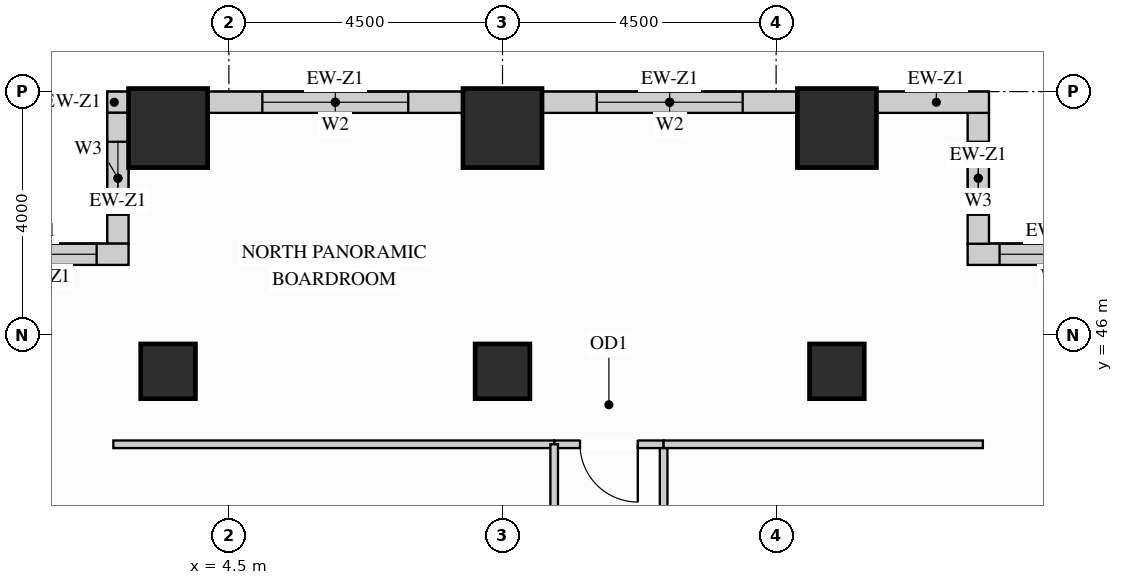
"""IFC4 building model, lengths in metres.
Left out: names, types, materials, properties, quantities, classifications, styles, units other than length and angle.
Written with IfcOpenShell. Run it as: python <this file> out.ifc"""

import sys

from ifc_helpers import new_model, si_unit, direction, frame, frame_2d, origin, origin_2d, place, context, subcontext, project, spatial, rectangle, extrude, source, transform, mapped, element, fill, save


model = new_model("IFC4")
c1 = context("Model", 3, precision=1e-05, world=origin(), true_north=direction((0.0, 1.0)))
c2 = subcontext(c1, "Body", "Model", "MODEL_VIEW")
j1 = project(units=[si_unit("LENGTHUNIT", "METRE"), si_unit("PLANEANGLEUNIT", "RADIAN")], contexts=[c1])
p1 = place(None, origin())
s1 = spatial("IfcSite", under=j1, at=p1, CompositionType="ELEMENT")
p2 = place(p1, origin())
s2 = spatial("IfcBuilding", under=s1, at=p2, CompositionType="ELEMENT")
p3 = place(p2, frame((0.0, 0.0, 54.9)))
s3 = spatial("IfcBuildingStorey", under=s2, at=p3, CompositionType="ELEMENT", Elevation=54.9)
m1 = source(origin(), c2, "Body", "SweptSolid", [
    extrude(rectangle(XDim=0.9, YDim=0.9, at=origin_2d()), origin(), (0.0, 0.0, 1.0), 3.38),
])
for number, where, z_axis, x_axis in (
    (1, (14.5, 45.4, 0.0), (0.0, 0.0, 1.0), (1.0, 0.0, 0.0)),
    (2, (3.5, 45.4, 0.0), (0.0, 0.0, 1.0), (1.0, 0.0, 0.0)),
    (3, (9.0, 45.4, 0.0), (0.0, 0.0, 1.0), (1.0, 0.0, 0.0)),
):
    element("IfcColumn", number, at=place(p3, frame(where, z_axis=z_axis, x_axis=x_axis)), inside=s3, PredefinedType="COLUMN", context=c2, shape_type="MappedRepresentation", body=[
        mapped(m1, transform((0.0, 0.0, 0.0), x_axis=(1.0, 0.0, 0.0), y_axis=(0.0, 1.0, 0.0), z_axis=(0.0, 0.0, 1.0))),
    ])
m2 = source(origin(), c2, "Body", "SweptSolid", [
    extrude(rectangle(XDim=1.3, YDim=1.3, at=origin_2d()), origin(), (0.0, 0.0, 1.0), 3.38),
])
for number, where, z_axis, x_axis in (
    (4, (14.5, 49.4, 0.0), (0.0, 0.0, 1.0), (1.0, 0.0, 0.0)),
    (5, (3.5, 49.4, 0.0), (0.0, 0.0, 1.0), (1.0, 0.0, 0.0)),
    (6, (9.0, 49.4, 0.0), (0.0, 0.0, 1.0), (1.0, 0.0, 0.0)),
):
    element("IfcColumn", number, at=place(p3, frame(where, z_axis=z_axis, x_axis=x_axis)), inside=s3, PredefinedType="COLUMN", context=c2, shape_type="MappedRepresentation", body=[
        mapped(m2, transform((0.0, 0.0, 0.0), x_axis=(1.0, 0.0, 0.0), y_axis=(0.0, 1.0, 0.0), z_axis=(0.0, 0.0, 1.0))),
    ])
p4 = place(p3, frame((19.5, 47.325, 0.0), z_axis=(0.0, 0.0, 1.0), x_axis=(-1.0, 0.0, 0.0)))
e7 = element("IfcWall", 7, at=p4, inside=s3, PredefinedType="SOLIDWALL", context=c2, shape_type="SweptSolid", body=[
    extrude(rectangle(XDim=2.85, YDim=0.35, at=frame_2d((1.425, 0.0))), origin(), (0.0, 0.0, 1.0), 3.365),
])
p5 = place(p4, frame((0.525, 0.0, 0.78)))
e8 = element("IfcOpeningElement", 8, at=p5, cuts=e7, PredefinedType="OPENING", context=c2, shape_type="SweptSolid", body=[
    extrude(rectangle(XDim=1.8, YDim=2.1, at=frame_2d((0.9, 1.05))), frame((0.0, 0.185, 0.0), z_axis=(0.0, -1.0, 0.0), x_axis=(1.0, 0.0, 0.0)), (0.0, 0.0, 1.0), 0.37),
])
p6 = place(p3, frame((16.825, 47.498, 0.0), z_axis=(0.0, 0.0, 1.0), x_axis=(0.0, 1.0, 0.0)))
e9 = element("IfcWall", 9, at=p6, inside=s3, PredefinedType="SOLIDWALL", context=c2, shape_type="SweptSolid", body=[
    extrude(rectangle(XDim=2.154, YDim=0.35, at=frame_2d((1.077, 0.0))), origin(), (0.0, 0.0, 1.0), 3.365),
])
p7 = place(p6, frame((0.477, 0.0, 0.78)))
e10 = element("IfcOpeningElement", 10, at=p7, cuts=e9, PredefinedType="OPENING", context=c2, shape_type="SweptSolid", body=[
    extrude(rectangle(XDim=1.2, YDim=2.1, at=frame_2d((0.6, 1.05))), frame((0.0, 0.185, 0.0), z_axis=(0.0, -1.0, 0.0), x_axis=(1.0, 0.0, 0.0)), (0.0, 0.0, 1.0), 0.37),
])
m3 = source(origin(), c2, "Body", "SweptSolid", [
    extrude(rectangle(XDim=1.852, YDim=0.35, at=frame_2d((0.926, 0.0))), origin(), (0.0, 0.0, 1.0), 3.365),
])
p8 = place(p3, frame((17.0, 49.825, 0.0), z_axis=(0.0, 0.0, 1.0), x_axis=(-1.0, 0.0, 0.0)))
e11 = element("IfcWall", 11, at=p8, inside=s3, PredefinedType="SOLIDWALL", context=c2, shape_type="MappedRepresentation", body=[
    mapped(m3, transform((0.0, 0.0, 0.0), x_axis=(1.0, 0.0, 0.0), y_axis=(0.0, 1.0, 0.0), z_axis=(0.0, 0.0, 1.0))),
])
p9 = place(p3, frame((13.852, 49.825, 0.0), z_axis=(0.0, 0.0, 1.0), x_axis=(-1.0, 0.0, 0.0)))
e12 = element("IfcWall", 12, at=p9, inside=s3, PredefinedType="SOLIDWALL", context=c2, shape_type="SweptSolid", body=[
    extrude(rectangle(XDim=4.204, YDim=0.35, at=frame_2d((2.102, 0.0))), origin(), (0.0, 0.0, 1.0), 2.51),
])
p10 = place(p9, frame((0.902, 0.0, 0.78)))
e13 = element("IfcOpeningElement", 13, at=p10, cuts=e12, PredefinedType="OPENING", context=c2, shape_type="SweptSolid", body=[
    extrude(rectangle(XDim=2.4, YDim=1.55, at=frame_2d((1.2, 0.775))), frame((0.0, 0.185, 0.0), z_axis=(0.0, -1.0, 0.0), x_axis=(1.0, 0.0, 0.0)), (0.0, 0.0, 1.0), 0.37),
])
p11 = place(p3, frame((8.352, 49.825, 0.0), z_axis=(0.0, 0.0, 1.0), x_axis=(-1.0, 0.0, 0.0)))
e14 = element("IfcWall", 14, at=p11, inside=s3, PredefinedType="SOLIDWALL", context=c2, shape_type="SweptSolid", body=[
    extrude(rectangle(XDim=4.204, YDim=0.35, at=frame_2d((2.102, 0.0))), origin(), (0.0, 0.0, 1.0), 2.51),
])
p12 = place(p11, frame((0.902, 0.0, 0.78)))
e15 = element("IfcOpeningElement", 15, at=p12, cuts=e14, PredefinedType="OPENING", context=c2, shape_type="SweptSolid", body=[
    extrude(rectangle(XDim=2.4, YDim=1.55, at=frame_2d((1.2, 0.775))), frame((0.0, 0.185, 0.0), z_axis=(0.0, -1.0, 0.0), x_axis=(1.0, 0.0, 0.0)), (0.0, 0.0, 1.0), 0.37),
])
m4 = source(origin(), c2, "Body", "SweptSolid", [
    extrude(rectangle(XDim=0.352, YDim=0.35, at=frame_2d((0.176, 0.0))), origin(), (0.0, 0.0, 1.0), 3.365),
])
p13 = place(p3, frame((2.852, 49.825, 0.0), z_axis=(0.0, 0.0, 1.0), x_axis=(-1.0, 0.0, 0.0)))
e16 = element("IfcWall", 16, at=p13, inside=s3, PredefinedType="SOLIDWALL", context=c2, shape_type="MappedRepresentation", body=[
    mapped(m4, transform((0.0, 0.0, 0.0), x_axis=(1.0, 0.0, 0.0), y_axis=(0.0, 1.0, 0.0), z_axis=(0.0, 0.0, 1.0))),
])
p14 = place(p3, frame((2.675, 49.652, 0.0), z_axis=(0.0, 0.0, 1.0), x_axis=(0.0, -1.0, 0.0)))
e17 = element("IfcWall", 17, at=p14, inside=s3, PredefinedType="SOLIDWALL", context=c2, shape_type="SweptSolid", body=[
    extrude(rectangle(XDim=2.154, YDim=0.35, at=frame_2d((1.077, 0.0))), origin(), (0.0, 0.0, 1.0), 3.365),
])
p15 = place(p14, frame((0.477, 0.0, 0.78)))
e18 = element("IfcOpeningElement", 18, at=p15, cuts=e17, PredefinedType="OPENING", context=c2, shape_type="SweptSolid", body=[
    extrude(rectangle(XDim=1.2, YDim=2.1, at=frame_2d((0.6, 1.05))), frame((0.0, 0.185, 0.0), z_axis=(0.0, -1.0, 0.0), x_axis=(1.0, 0.0, 0.0)), (0.0, 0.0, 1.0), 0.37),
])
p16 = place(p3, frame((2.85, 47.325, 0.0), z_axis=(0.0, 0.0, 1.0), x_axis=(-1.0, 0.0, 0.0)))
e19 = element("IfcWall", 19, at=p16, inside=s3, PredefinedType="SOLIDWALL", context=c2, shape_type="SweptSolid", body=[
    extrude(rectangle(XDim=2.85, YDim=0.35, at=frame_2d((1.425, 0.0))), origin(), (0.0, 0.0, 1.0), 3.365),
])
p17 = place(p16, frame((0.525, 0.0, 0.78)))
e20 = element("IfcOpeningElement", 20, at=p17, cuts=e19, PredefinedType="OPENING", context=c2, shape_type="SweptSolid", body=[
    extrude(rectangle(XDim=1.8, YDim=2.1, at=frame_2d((0.9, 1.05))), frame((0.0, 0.185, 0.0), z_axis=(0.0, -1.0, 0.0), x_axis=(1.0, 0.0, 0.0)), (0.0, 0.0, 1.0), 0.37),
])
p18 = place(p3, frame((11.65, 38.287, 0.0), z_axis=(0.0, 0.0, 1.0), x_axis=(0.0, 1.0, 0.0)))
e21 = element("IfcWall", 21, at=p18, inside=s3, PredefinedType="PARTITIONING", context=c2, shape_type="SweptSolid", body=[
    extrude(rectangle(XDim=5.913, YDim=0.125, at=frame_2d((2.957, 0.0))), origin(), (0.0, 0.0, 1.0), 3.365),
])
p19 = place(p18, frame((2.481, 0.0, 0.0)))
e22 = element("IfcOpeningElement", 22, at=p19, cuts=e21, PredefinedType="OPENING", context=c2, shape_type="SweptSolid", body=[
    extrude(rectangle(XDim=0.95, YDim=2.15, at=frame_2d((0.475, 1.075))), frame((0.0, 0.073, 0.0), z_axis=(0.0, -1.0, 0.0), x_axis=(1.0, 0.0, 0.0)), (0.0, 0.0, 1.0), 0.145),
])
p20 = place(p3, frame((9.85, 44.2, 0.0), z_axis=(0.0, 0.0, 1.0), x_axis=(1.0, 0.0, 0.0)))
e23 = element("IfcWall", 23, at=p20, inside=s3, PredefinedType="PARTITIONING", context=c2, shape_type="SweptSolid", body=[
    extrude(rectangle(XDim=1.8, YDim=0.125, at=frame_2d((0.9, 0.0))), origin(), (0.0, 0.0, 1.0), 3.365),
])
p21 = place(p20, frame((0.425, 0.0, 0.0)))
e24 = element("IfcOpeningElement", 24, at=p21, cuts=e23, PredefinedType="OPENING", context=c2, shape_type="SweptSolid", body=[
    extrude(rectangle(XDim=0.95, YDim=2.15, at=frame_2d((0.475, 1.075))), frame((0.0, 0.073, 0.0), z_axis=(0.0, -1.0, 0.0), x_axis=(1.0, 0.0, 0.0)), (0.0, 0.0, 1.0), 0.145),
])
m5 = source(origin(), c2, "Body", "SweptSolid", [
    extrude(rectangle(XDim=5.25, YDim=0.125, at=frame_2d((2.625, 0.0))), origin(), (0.0, 0.0, 1.0), 3.365),
])
p22 = place(p3, frame((11.65, 44.2, 0.0), z_axis=(0.0, 0.0, 1.0), x_axis=(1.0, 0.0, 0.0)))
e25 = element("IfcWall", 25, at=p22, inside=s3, PredefinedType="PARTITIONING", context=c2, shape_type="MappedRepresentation", body=[
    mapped(m5, transform((0.0, 0.0, 0.0), x_axis=(1.0, 0.0, 0.0), y_axis=(0.0, 1.0, 0.0), z_axis=(0.0, 0.0, 1.0))),
])
m6 = source(origin(), c2, "Body", "SweptSolid", [
    extrude(rectangle(XDim=7.25, YDim=0.125, at=frame_2d((3.625, 0.0))), origin(), (0.0, 0.0, 1.0), 3.365),
])
p23 = place(p3, frame((2.6, 44.2, 0.0), z_axis=(0.0, 0.0, 1.0), x_axis=(1.0, 0.0, 0.0)))
e26 = element("IfcWall", 26, at=p23, inside=s3, PredefinedType="PARTITIONING", context=c2, shape_type="MappedRepresentation", body=[
    mapped(m6, transform((0.0, 0.0, 0.0), x_axis=(1.0, 0.0, 0.0), y_axis=(0.0, 1.0, 0.0), z_axis=(0.0, 0.0, 1.0))),
])
p24 = place(p3, frame((9.85, 33.25, 0.0), z_axis=(0.0, 0.0, 1.0), x_axis=(0.0, 1.0, 0.0)))
e27 = element("IfcWall", 27, at=p24, inside=s3, PredefinedType="PARTITIONING", context=c2, shape_type="SweptSolid", body=[
    extrude(rectangle(XDim=10.95, YDim=0.125, at=frame_2d((5.475, 0.0))), origin(), (0.0, 0.0, 1.0), 3.365),
])
p25 = place(p24, frame((5.803, 0.0, 0.0)))
e28 = element("IfcOpeningElement", 28, at=p25, cuts=e27, PredefinedType="OPENING", context=c2, shape_type="SweptSolid", body=[
    extrude(rectangle(XDim=0.95, YDim=2.15, at=frame_2d((0.475, 1.075))), frame((0.0, 0.073, 0.0), z_axis=(0.0, -1.0, 0.0), x_axis=(1.0, 0.0, 0.0)), (0.0, 0.0, 1.0), 0.145),
])
m7 = source(origin(), c2, "Body", "SweptSolid", [
    extrude(rectangle(XDim=0.95, YDim=2.15, at=frame_2d((0.475, 1.075))), frame((0.0, 0.025, 0.0), z_axis=(0.0, -1.0, 0.0), x_axis=(1.0, 0.0, 0.0)), (0.0, 0.0, 1.0), 0.05),
])
p26 = place(p21, origin())
e29 = element("IfcDoor", 29, at=p26, inside=s3, OperationType="SINGLE_SWING_RIGHT", PredefinedType="DOOR", context=c2, shape_type="MappedRepresentation", body=[
    mapped(m7, transform((0.0, 0.0, 0.0), x_axis=(1.0, 0.0, 0.0), y_axis=(0.0, 1.0, 0.0), z_axis=(0.0, 0.0, 1.0))),
])
fill(e24, e29)
m8 = source(origin(), c2, "Body", "SweptSolid", [
    extrude(rectangle(XDim=1.8, YDim=2.1, at=frame_2d((0.9, 1.05))), frame((0.0, 0.03, 0.0), z_axis=(0.0, -1.0, 0.0), x_axis=(1.0, 0.0, 0.0)), (0.0, 0.0, 1.0), 0.06),
])
p27 = place(p5, origin())
e30 = element("IfcWindow", 30, at=p27, inside=s3, PartitioningType="SINGLE_PANEL", PredefinedType="WINDOW", context=c2, shape_type="MappedRepresentation", body=[
    mapped(m8, transform((0.0, 0.0, 0.0), x_axis=(1.0, 0.0, 0.0), y_axis=(0.0, 1.0, 0.0), z_axis=(0.0, 0.0, 1.0))),
])
fill(e8, e30)
p28 = place(p17, origin())
e31 = element("IfcWindow", 31, at=p28, inside=s3, PartitioningType="SINGLE_PANEL", PredefinedType="WINDOW", context=c2, shape_type="MappedRepresentation", body=[
    mapped(m8, transform((0.0, 0.0, 0.0), x_axis=(1.0, 0.0, 0.0), y_axis=(0.0, 1.0, 0.0), z_axis=(0.0, 0.0, 1.0))),
])
fill(e20, e31)
m9 = source(origin(), c2, "Body", "SweptSolid", [
    extrude(rectangle(XDim=2.4, YDim=1.55, at=frame_2d((1.2, 0.775))), frame((0.0, 0.03, 0.0), z_axis=(0.0, -1.0, 0.0), x_axis=(1.0, 0.0, 0.0)), (0.0, 0.0, 1.0), 0.06),
])
p29 = place(p10, origin())
e32 = element("IfcWindow", 32, at=p29, inside=s3, PartitioningType="SINGLE_PANEL", PredefinedType="WINDOW", context=c2, shape_type="MappedRepresentation", body=[
    mapped(m9, transform((0.0, 0.0, 0.0), x_axis=(1.0, 0.0, 0.0), y_axis=(0.0, 1.0, 0.0), z_axis=(0.0, 0.0, 1.0))),
])
fill(e13, e32)
p30 = place(p12, origin())
e33 = element("IfcWindow", 33, at=p30, inside=s3, PartitioningType="SINGLE_PANEL", PredefinedType="WINDOW", context=c2, shape_type="MappedRepresentation", body=[
    mapped(m9, transform((0.0, 0.0, 0.0), x_axis=(1.0, 0.0, 0.0), y_axis=(0.0, 1.0, 0.0), z_axis=(0.0, 0.0, 1.0))),
])
fill(e15, e33)
m10 = source(origin(), c2, "Body", "SweptSolid", [
    extrude(rectangle(XDim=1.2, YDim=2.1, at=frame_2d((0.6, 1.05))), frame((0.0, 0.03, 0.0), z_axis=(0.0, -1.0, 0.0), x_axis=(1.0, 0.0, 0.0)), (0.0, 0.0, 1.0), 0.06),
])
p31 = place(p7, origin())
e34 = element("IfcWindow", 34, at=p31, inside=s3, PartitioningType="SINGLE_PANEL", PredefinedType="WINDOW", context=c2, shape_type="MappedRepresentation", body=[
    mapped(m10, transform((0.0, 0.0, 0.0), x_axis=(1.0, 0.0, 0.0), y_axis=(0.0, 1.0, 0.0), z_axis=(0.0, 0.0, 1.0))),
])
fill(e10, e34)
p32 = place(p15, origin())
e35 = element("IfcWindow", 35, at=p32, inside=s3, PartitioningType="SINGLE_PANEL", PredefinedType="WINDOW", context=c2, shape_type="MappedRepresentation", body=[
    mapped(m10, transform((0.0, 0.0, 0.0), x_axis=(1.0, 0.0, 0.0), y_axis=(0.0, 1.0, 0.0), z_axis=(0.0, 0.0, 1.0))),
])
fill(e18, e35)
save(model, sys.argv[1])
